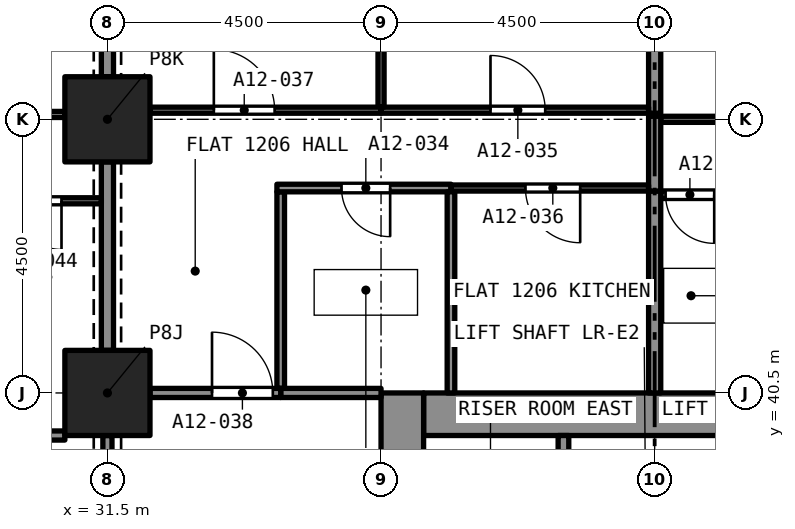
"""IFC4 building model, lengths in metres.
Left out: names, types, materials, properties, quantities, classifications, styles, units other than length and angle.
Written with IfcOpenShell. Run it as: python <this file> out.ifc"""

import sys

from ifc_helpers import new_model, si_unit, direction, frame, frame_2d, origin, origin_2d, place, context, subcontext, project, spatial, rectangle, extrude, element, fill, save


model = new_model("IFC4")
c1 = context("Model", 3, precision=1e-05, world=origin(), true_north=direction((0.0, 1.0)))
c2 = subcontext(c1, "Body", "Model", "MODEL_VIEW")
j1 = project(units=[si_unit("LENGTHUNIT", "METRE"), si_unit("PLANEANGLEUNIT", "RADIAN")], contexts=[c1])
p1 = place(None, origin())
s1 = spatial("IfcSite", under=j1, at=p1, CompositionType="ELEMENT")
p2 = place(p1, origin())
s2 = spatial("IfcBuilding", under=s1, at=p2, CompositionType="ELEMENT")
p3 = place(p2, frame((0.0, 0.0, 49.6)))
s3 = spatial("IfcBuildingStorey", under=s2, at=p3, CompositionType="ELEMENT", Elevation=49.6)
for number, where, z_axis, x_axis in (
    (1, (31.5, 40.5, 0.0), (0.0, 0.0, 1.0), (1.0, 0.0, 0.0)),
    (2, (31.5, 45.0, 0.0), (0.0, 0.0, 1.0), (1.0, 0.0, 0.0)),
):
    element("IfcColumn", number, at=place(p3, frame(where, z_axis=z_axis, x_axis=x_axis)), inside=s3, PredefinedType="COLUMN", context=c2, shape_type="SweptSolid", body=[
        extrude(rectangle(XDim=1.4, YDim=1.4, at=origin_2d()), origin(), (0.0, 0.0, 1.0), 3.2),
    ])
p4 = place(p3, frame((36.7, 40.15, 0.0), z_axis=(0.0, 0.0, 1.0), x_axis=(1.0, 0.0, 0.0)))
e3 = element("IfcWall", 3, at=p4, inside=s3, PredefinedType="SOLIDWALL", context=c2, shape_type="SweptSolid", body=[
    extrude(rectangle(XDim=7.6, YDim=0.7, at=frame_2d((3.8, 0.0))), origin(), (0.0, 0.0, 1.0), 3.2),
])
p5 = place(p3, frame((36.35, 27.0, 0.0), z_axis=(0.0, 0.0, 1.0), x_axis=(0.0, 1.0, 0.0)))
e4 = element("IfcWall", 4, at=p5, inside=s3, PredefinedType="SOLIDWALL", context=c2, shape_type="SweptSolid", body=[
    extrude(rectangle(XDim=13.5, YDim=0.7, at=frame_2d((6.75, 0.0))), origin(), (0.0, 0.0, 1.0), 3.2),
])
p6 = place(p5, frame((8.95, 0.0, 0.0)))
e5 = element("IfcOpeningElement", 5, at=p6, cuts=e4, PredefinedType="OPENING", context=c2, shape_type="SweptSolid", body=[
    extrude(rectangle(XDim=1.2, YDim=2.1, at=frame_2d((0.6, 1.05))), frame((0.0, 0.36, 0.0), z_axis=(0.0, -1.0, 0.0), x_axis=(1.0, 0.0, 0.0)), (0.0, 0.0, 1.0), 0.72),
])
p7 = place(p3, frame((41.659, 43.76, 0.0), z_axis=(0.0, 0.0, 1.0), x_axis=(-1.0, 0.0, 0.0)))
e6 = element("IfcWall", 6, at=p7, inside=s3, PredefinedType="PARTITIONING", context=c2, shape_type="SweptSolid", body=[
    extrude(rectangle(XDim=1.059, YDim=0.125, at=frame_2d((0.53, 0.0))), origin(), (0.0, 0.0, 1.0), 2.9),
])
p8 = place(p7, frame((0.179, 0.0, 0.0)))
e7 = element("IfcOpeningElement", 7, at=p8, cuts=e6, PredefinedType="OPENING", context=c2, shape_type="SweptSolid", body=[
    extrude(rectangle(XDim=0.8, YDim=2.1, at=frame_2d((0.4, 1.05))), frame((0.0, 0.073, 0.0), z_axis=(0.0, -1.0, 0.0), x_axis=(1.0, 0.0, 0.0)), (0.0, 0.0, 1.0), 0.145),
])
p9 = place(p3, frame((40.5, 40.5, 0.0), z_axis=(0.0, 0.0, 1.0), x_axis=(0.0, 1.0, 0.0)))
e8 = element("IfcWall", 8, at=p9, inside=s3, PredefinedType="PARTITIONING", context=c2, shape_type="SweptSolid", body=[
    extrude(rectangle(XDim=3.323, YDim=0.2, at=frame_2d((1.661, 0.0))), origin(), (0.0, 0.0, 1.0), 2.9),
])
p10 = place(p3, frame((40.6, 45.0, 0.0), z_axis=(0.0, 0.0, 1.0), x_axis=(1.0, 0.0, 0.0)))
e9 = element("IfcWall", 9, at=p10, inside=s3, PredefinedType="PARTITIONING", context=c2, shape_type="SweptSolid", body=[
    extrude(rectangle(XDim=4.4, YDim=0.1, at=frame_2d((2.2, 0.0))), origin(), (0.0, 0.0, 1.0), 2.9),
])
p11 = place(p10, frame((1.7, 0.0, 0.0)))
e10 = element("IfcOpeningElement", 10, at=p11, cuts=e9, PredefinedType="OPENING", context=c2, shape_type="SweptSolid", body=[
    extrude(rectangle(XDim=0.9, YDim=2.1, at=frame_2d((0.45, 1.05))), frame((0.0, 0.06, 0.0), z_axis=(0.0, -1.0, 0.0), x_axis=(1.0, 0.0, 0.0)), (0.0, 0.0, 1.0), 0.12),
])
p12 = place(p3, frame((40.5, 45.1, 0.0), z_axis=(0.0, 0.0, 1.0), x_axis=(0.0, 1.0, 0.0)))
e11 = element("IfcWall", 11, at=p12, inside=s3, PredefinedType="PARTITIONING", context=c2, shape_type="SweptSolid", body=[
    extrude(rectangle(XDim=3.7, YDim=0.2, at=frame_2d((1.85, 0.0))), origin(), (0.0, 0.0, 1.0), 2.9),
])
p13 = place(p3, frame((40.5, 43.82, 0.0), z_axis=(0.0, 0.0, 1.0), x_axis=(0.0, 1.0, 0.0)))
e12 = element("IfcWall", 12, at=p13, inside=s3, PredefinedType="PARTITIONING", context=c2, shape_type="SweptSolid", body=[
    extrude(rectangle(XDim=1.23, YDim=0.2, at=frame_2d((0.615, 0.0))), origin(), (0.0, 0.0, 1.0), 2.9),
])
p14 = place(p3, frame((34.35, 40.575, 0.0), z_axis=(0.0, 0.0, 1.0), x_axis=(0.0, 1.0, 0.0)))
e13 = element("IfcWall", 13, at=p14, inside=s3, PredefinedType="PARTITIONING", context=c2, shape_type="SweptSolid", body=[
    extrude(rectangle(XDim=3.233, YDim=0.125, at=frame_2d((1.616, 0.0))), origin(), (0.0, 0.0, 1.0), 2.9),
])
p15 = place(p3, frame((37.15, 43.87, 0.0), z_axis=(0.0, 0.0, 1.0), x_axis=(-1.0, 0.0, 0.0)))
e14 = element("IfcWall", 14, at=p15, inside=s3, PredefinedType="PARTITIONING", context=c2, shape_type="SweptSolid", body=[
    extrude(rectangle(XDim=2.862, YDim=0.125, at=frame_2d((1.431, 0.0))), origin(), (0.0, 0.0, 1.0), 2.9),
])
p16 = place(p15, frame((1.0, 0.0, 0.0)))
e15 = element("IfcOpeningElement", 15, at=p16, cuts=e14, PredefinedType="OPENING", context=c2, shape_type="SweptSolid", body=[
    extrude(rectangle(XDim=0.8, YDim=2.1, at=frame_2d((0.4, 1.05))), frame((0.0, 0.073, 0.0), z_axis=(0.0, -1.0, 0.0), x_axis=(1.0, 0.0, 0.0)), (0.0, 0.0, 1.0), 0.145),
])
p17 = place(p3, frame((37.15, 40.5, 0.0), z_axis=(0.0, 0.0, 1.0), x_axis=(0.0, 1.0, 0.0)))
e16 = element("IfcWall", 16, at=p17, inside=s3, PredefinedType="PARTITIONING", context=c2, shape_type="SweptSolid", body=[
    extrude(rectangle(XDim=3.308, YDim=0.125, at=frame_2d((1.654, 0.0))), origin(), (0.0, 0.0, 1.0), 2.9),
])
p18 = place(p3, frame((34.35, 40.5, 0.0), z_axis=(0.0, 0.0, 1.0), x_axis=(1.0, 0.0, 0.0)))
e17 = element("IfcWall", 17, at=p18, inside=s3, PredefinedType="PARTITIONING", context=c2, shape_type="SweptSolid", body=[
    extrude(rectangle(XDim=1.65, YDim=0.15, at=frame_2d((0.825, 0.0))), origin(), (0.0, 0.0, 1.0), 2.9),
])
p19 = place(p3, frame((36.0, 45.15, 0.0), z_axis=(0.0, 0.0, 1.0), x_axis=(1.0, 0.0, 0.0)))
e18 = element("IfcWall", 18, at=p19, inside=s3, PredefinedType="PARTITIONING", context=c2, shape_type="SweptSolid", body=[
    extrude(rectangle(XDim=4.4, YDim=0.1, at=frame_2d((2.2, 0.0))), origin(), (0.0, 0.0, 1.0), 2.9),
])
p20 = place(p19, frame((1.8, 0.0, 0.0)))
e19 = element("IfcOpeningElement", 19, at=p20, cuts=e18, PredefinedType="OPENING", context=c2, shape_type="SweptSolid", body=[
    extrude(rectangle(XDim=0.9, YDim=2.1, at=frame_2d((0.45, 1.05))), frame((0.0, 0.06, 0.0), z_axis=(0.0, -1.0, 0.0), x_axis=(1.0, 0.0, 0.0)), (0.0, 0.0, 1.0), 0.12),
])
p21 = place(p3, frame((36.0, 45.2, 0.0), z_axis=(0.0, 0.0, 1.0), x_axis=(0.0, 1.0, 0.0)))
e20 = element("IfcWall", 20, at=p21, inside=s3, PredefinedType="PARTITIONING", context=c2, shape_type="SweptSolid", body=[
    extrude(rectangle(XDim=3.6, YDim=0.1, at=frame_2d((1.8, 0.0))), origin(), (0.0, 0.0, 1.0), 2.9),
])
p22 = place(p3, frame((40.4, 43.87, 0.0), z_axis=(0.0, 0.0, 1.0), x_axis=(-1.0, 0.0, 0.0)))
e21 = element("IfcWall", 21, at=p22, inside=s3, PredefinedType="PARTITIONING", context=c2, shape_type="SweptSolid", body=[
    extrude(rectangle(XDim=3.25, YDim=0.1, at=frame_2d((1.625, 0.0))), origin(), (0.0, 0.0, 1.0), 2.9),
])
p23 = place(p22, frame((1.125, 0.0, 0.0)))
e22 = element("IfcOpeningElement", 22, at=p23, cuts=e21, PredefinedType="OPENING", context=c2, shape_type="SweptSolid", body=[
    extrude(rectangle(XDim=0.9, YDim=2.1, at=frame_2d((0.45, 1.05))), frame((0.0, 0.06, 0.0), z_axis=(0.0, -1.0, 0.0), x_axis=(1.0, 0.0, 0.0)), (0.0, 0.0, 1.0), 0.12),
])
p24 = place(p3, frame((32.2, 45.15, 0.0), z_axis=(0.0, 0.0, 1.0), x_axis=(1.0, 0.0, 0.0)))
e23 = element("IfcWall", 23, at=p24, inside=s3, PredefinedType="PARTITIONING", context=c2, shape_type="SweptSolid", body=[
    extrude(rectangle(XDim=3.8, YDim=0.1, at=frame_2d((1.9, 0.0))), origin(), (0.0, 0.0, 1.0), 2.9),
])
p25 = place(p24, frame((1.05, 0.0, 0.0)))
e24 = element("IfcOpeningElement", 24, at=p25, cuts=e23, PredefinedType="OPENING", context=c2, shape_type="SweptSolid", body=[
    extrude(rectangle(XDim=1.0, YDim=2.1, at=frame_2d((0.5, 1.05))), frame((0.0, 0.06, 0.0), z_axis=(0.0, -1.0, 0.0), x_axis=(1.0, 0.0, 0.0)), (0.0, 0.0, 1.0), 0.12),
])
p26 = place(p3, frame((31.5, 41.2, 0.0), z_axis=(0.0, 0.0, 1.0), x_axis=(0.0, 1.0, 0.0)))
e25 = element("IfcWall", 25, at=p26, inside=s3, PredefinedType="PARTITIONING", context=c2, shape_type="SweptSolid", body=[
    extrude(rectangle(XDim=3.1, YDim=0.2, at=frame_2d((1.55, 0.0))), origin(), (0.0, 0.0, 1.0), 2.38),
])
p27 = place(p3, frame((32.2, 40.5, 0.0), z_axis=(0.0, 0.0, 1.0), x_axis=(1.0, 0.0, 0.0)))
e26 = element("IfcWall", 26, at=p27, inside=s3, PredefinedType="PARTITIONING", context=c2, shape_type="SweptSolid", body=[
    extrude(rectangle(XDim=2.15, YDim=0.15, at=frame_2d((1.075, 0.0))), origin(), (0.0, 0.0, 1.0), 2.9),
])
p28 = place(p27, frame((1.02, 0.0, 0.0)))
e27 = element("IfcOpeningElement", 27, at=p28, cuts=e26, PredefinedType="OPENING", context=c2, shape_type="SweptSolid", body=[
    extrude(rectangle(XDim=1.0, YDim=2.1, at=frame_2d((0.5, 1.05))), frame((0.0, 0.085, 0.0), z_axis=(0.0, -1.0, 0.0), x_axis=(1.0, 0.0, 0.0)), (0.0, 0.0, 1.0), 0.17),
])
p29 = place(p3, frame((31.5, 45.7, 0.0), z_axis=(0.0, 0.0, 1.0), x_axis=(0.0, 1.0, 0.0)))
e28 = element("IfcWall", 28, at=p29, inside=s3, PredefinedType="PARTITIONING", context=c2, shape_type="SweptSolid", body=[
    extrude(rectangle(XDim=3.1, YDim=0.2, at=frame_2d((1.55, 0.0))), origin(), (0.0, 0.0, 1.0), 2.38),
])
p30 = place(p3, frame((27.0, 45.08, 0.0), z_axis=(0.0, 0.0, 1.0), x_axis=(1.0, 0.0, 0.0)))
e29 = element("IfcWall", 29, at=p30, inside=s3, PredefinedType="PARTITIONING", context=c2, shape_type="SweptSolid", body=[
    extrude(rectangle(XDim=3.8, YDim=0.1, at=frame_2d((1.9, 0.0))), origin(), (0.0, 0.0, 1.0), 2.75),
])
p31 = place(p30, frame((1.8, 0.0, 0.0)))
e30 = element("IfcOpeningElement", 30, at=p31, cuts=e29, PredefinedType="OPENING", context=c2, shape_type="SweptSolid", body=[
    extrude(rectangle(XDim=0.9, YDim=2.1, at=frame_2d((0.45, 1.05))), frame((0.0, 0.06, 0.0), z_axis=(0.0, -1.0, 0.0), x_axis=(1.0, 0.0, 0.0)), (0.0, 0.0, 1.0), 0.12),
])
p32 = place(p3, frame((31.4, 43.66, 0.0), z_axis=(0.0, 0.0, 1.0), x_axis=(-1.0, 0.0, 0.0)))
e31 = element("IfcWall", 31, at=p32, inside=s3, PredefinedType="PARTITIONING", context=c2, shape_type="SweptSolid", body=[
    extrude(rectangle(XDim=1.811, YDim=0.1, at=frame_2d((0.905, 0.0))), origin(), (0.0, 0.0, 1.0), 2.75),
])
p33 = place(p32, frame((0.655, 0.0, 0.0)))
e32 = element("IfcOpeningElement", 32, at=p33, cuts=e31, PredefinedType="OPENING", context=c2, shape_type="SweptSolid", body=[
    extrude(rectangle(XDim=0.8, YDim=2.1, at=frame_2d((0.4, 1.05))), frame((0.0, 0.06, 0.0), z_axis=(0.0, -1.0, 0.0), x_axis=(1.0, 0.0, 0.0)), (0.0, 0.0, 1.0), 0.12),
])
p34 = place(p3, frame((25.35, 39.8, 0.0), z_axis=(0.0, 0.0, 1.0), x_axis=(1.0, 0.0, 0.0)))
e33 = element("IfcWall", 33, at=p34, inside=s3, PredefinedType="PARTITIONING", context=c2, shape_type="SweptSolid", body=[
    extrude(rectangle(XDim=5.45, YDim=0.15, at=frame_2d((2.725, 0.0))), origin(), (0.0, 0.0, 1.0), 2.75),
])
p35 = place(p3, frame((31.5, 36.7, 0.0), z_axis=(0.0, 0.0, 1.0), x_axis=(0.0, 1.0, 0.0)))
e34 = element("IfcWall", 34, at=p35, inside=s3, PredefinedType="PARTITIONING", context=c2, shape_type="SweptSolid", body=[
    extrude(rectangle(XDim=3.1, YDim=0.15, at=frame_2d((1.55, 0.0))), origin(), (0.0, 0.0, 1.0), 2.38),
])
p36 = place(p35, frame((0.95, 0.0, 0.0)))
e35 = element("IfcOpeningElement", 35, at=p36, cuts=e34, PredefinedType="OPENING", context=c2, shape_type="SweptSolid", body=[
    extrude(rectangle(XDim=1.2, YDim=2.1, at=frame_2d((0.6, 1.05))), frame((0.0, 0.085, 0.0), z_axis=(0.0, -1.0, 0.0), x_axis=(1.0, 0.0, 0.0)), (0.0, 0.0, 1.0), 0.17),
])
p37 = place(p3, frame((39.0, 37.5, 0.0), z_axis=(0.0, 0.0, 1.0), x_axis=(0.0, 1.0, 0.0)))
e36 = element("IfcWall", 36, at=p37, inside=s3, PredefinedType="SOLIDWALL", context=c2, shape_type="SweptSolid", body=[
    extrude(rectangle(XDim=2.3, YDim=0.175, at=frame_2d((1.15, 0.0))), origin(), (0.0, 0.0, 1.0), 2.9),
])
p38 = place(p8, origin())
e37 = element("IfcDoor", 37, at=p38, inside=s3, OperationType="SINGLE_SWING_RIGHT", PredefinedType="DOOR", context=c2, shape_type="SweptSolid", body=[
    extrude(rectangle(XDim=0.8, YDim=2.1, at=frame_2d((0.4, 1.05))), frame((0.0, 0.025, 0.0), z_axis=(0.0, -1.0, 0.0), x_axis=(1.0, 0.0, 0.0)), (0.0, 0.0, 1.0), 0.05),
])
fill(e7, e37)
p39 = place(p16, origin())
e38 = element("IfcDoor", 38, at=p39, inside=s3, OperationType="SINGLE_SWING_LEFT", PredefinedType="DOOR", context=c2, shape_type="SweptSolid", body=[
    extrude(rectangle(XDim=0.8, YDim=2.1, at=frame_2d((0.4, 1.05))), frame((0.0, 0.025, 0.0), z_axis=(0.0, -1.0, 0.0), x_axis=(1.0, 0.0, 0.0)), (0.0, 0.0, 1.0), 0.05),
])
fill(e15, e38)
p40 = place(p20, origin())
e39 = element("IfcDoor", 39, at=p40, inside=s3, OperationType="SINGLE_SWING_RIGHT", PredefinedType="DOOR", context=c2, shape_type="SweptSolid", body=[
    extrude(rectangle(XDim=0.9, YDim=2.1, at=frame_2d((0.45, 1.05))), frame((0.0, 0.025, 0.0), z_axis=(0.0, -1.0, 0.0), x_axis=(1.0, 0.0, 0.0)), (0.0, 0.0, 1.0), 0.05),
])
fill(e19, e39)
p41 = place(p23, origin())
e40 = element("IfcDoor", 40, at=p41, inside=s3, OperationType="SINGLE_SWING_LEFT", PredefinedType="DOOR", context=c2, shape_type="SweptSolid", body=[
    extrude(rectangle(XDim=0.9, YDim=2.1, at=frame_2d((0.45, 1.05))), frame((0.0, 0.025, 0.0), z_axis=(0.0, -1.0, 0.0), x_axis=(1.0, 0.0, 0.0)), (0.0, 0.0, 1.0), 0.05),
])
fill(e22, e40)
p42 = place(p25, origin())
e41 = element("IfcDoor", 41, at=p42, inside=s3, OperationType="SINGLE_SWING_LEFT", PredefinedType="DOOR", context=c2, shape_type="SweptSolid", body=[
    extrude(rectangle(XDim=1.0, YDim=2.1, at=frame_2d((0.5, 1.05))), frame((0.0, 0.025, 0.0), z_axis=(0.0, -1.0, 0.0), x_axis=(1.0, 0.0, 0.0)), (0.0, 0.0, 1.0), 0.05),
])
fill(e24, e41)
p43 = place(p28, origin())
e42 = element("IfcDoor", 42, at=p43, inside=s3, OperationType="SINGLE_SWING_RIGHT", PredefinedType="DOOR", context=c2, shape_type="SweptSolid", body=[
    extrude(rectangle(XDim=1.0, YDim=2.1, at=frame_2d((0.5, 1.05))), frame((0.0, 0.025, 0.0), z_axis=(0.0, -1.0, 0.0), x_axis=(1.0, 0.0, 0.0)), (0.0, 0.0, 1.0), 0.05),
])
fill(e27, e42)
p44 = place(p33, origin())
e43 = element("IfcDoor", 43, at=p44, inside=s3, OperationType="SINGLE_SWING_RIGHT", PredefinedType="DOOR", context=c2, shape_type="SweptSolid", body=[
    extrude(rectangle(XDim=0.8, YDim=2.1, at=frame_2d((0.4, 1.05))), frame((0.0, 0.025, 0.0), z_axis=(0.0, -1.0, 0.0), x_axis=(1.0, 0.0, 0.0)), (0.0, 0.0, 1.0), 0.05),
])
fill(e32, e43)
save(model, sys.argv[1])
